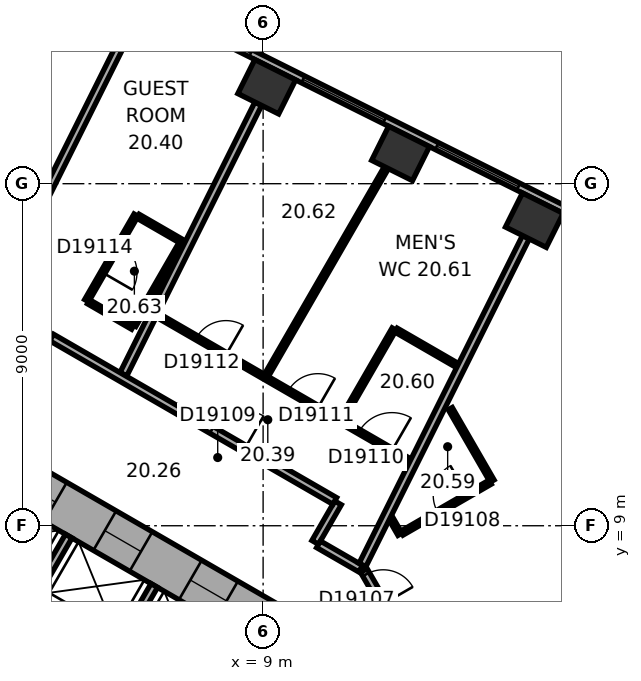
"""IFC4 building model, lengths in metres.
Left out: names, types, materials, properties, quantities, classifications, styles, units other than length and angle.
Written with IfcOpenShell. Run it as: python <this file> out.ifc"""

import sys

from ifc_helpers import new_model, si_unit, direction, frame, frame_2d, origin, origin_2d, place, context, subcontext, project, spatial, rectangle, extrude, element, fill, save


model = new_model("IFC4")
c1 = context("Model", 3, precision=1e-05, world=origin(), true_north=direction((0.0, 1.0)))
c2 = subcontext(c1, "Body", "Model", "MODEL_VIEW")
j1 = project(units=[si_unit("LENGTHUNIT", "METRE"), si_unit("PLANEANGLEUNIT", "RADIAN")], contexts=[c1])
p1 = place(None, origin())
s1 = spatial("IfcSite", under=j1, at=p1, CompositionType="ELEMENT")
p2 = place(p1, origin())
s2 = spatial("IfcBuilding", under=s1, at=p2, CompositionType="ELEMENT")
p3 = place(p2, frame((0.0, 0.0, 90.2)))
s3 = spatial("IfcBuildingStorey", under=s2, at=p3, CompositionType="ELEMENT", Elevation=90.2)
for number, where, z_axis, x_axis in (
    (1, (16.138, 17.04, 0.0), (0.0, 0.0, 1.0), (-0.895, 0.446, 0.0)),
    (2, (12.616, 18.795, 0.0), (0.0, 0.0, 1.0), (-0.895, 0.446, 0.0)),
    (3, (9.095, 20.551, 0.0), (0.0, 0.0, 1.0), (-0.895, 0.446, 0.0)),
):
    element("IfcColumn", number, at=place(p3, frame(where, z_axis=z_axis, x_axis=x_axis)), inside=s3, PredefinedType="COLUMN", context=c2, shape_type="SweptSolid", body=[
        extrude(rectangle(XDim=1.2, YDim=1.0, at=origin_2d()), origin(), (0.0, 0.0, 1.0), 3.3),
    ])
p4 = place(p3, frame((10.4, 5.658, 0.0), z_axis=(0.0, 0.0, 1.0), x_axis=(-0.866021384402, 0.500006961711, 0.0)))
e4 = element("IfcWall", 4, at=p4, inside=s3, PredefinedType="SHEAR", context=c2, shape_type="SweptSolid", body=[
    extrude(rectangle(XDim=12.355, YDim=1.2, at=frame_2d((6.178, 0.0))), origin(), (0.0, 0.0, 1.0), 3.3),
])
p5 = place(p4, frame((2.728, 0.0, 0.0)))
e5 = element("IfcOpeningElement", 5, at=p5, cuts=e4, PredefinedType="OPENING", context=c2, shape_type="SweptSolid", body=[
    extrude(rectangle(XDim=1.1, YDim=2.1, at=frame_2d((0.55, 1.05))), frame((0.0, 0.61, 0.0), z_axis=(0.0, -1.0, 0.0), x_axis=(1.0, 0.0, 0.0)), (0.0, 0.0, 1.0), 1.22),
])
p6 = place(p4, frame((5.328, 0.0, 0.0)))
e6 = element("IfcOpeningElement", 6, at=p6, cuts=e4, PredefinedType="OPENING", context=c2, shape_type="SweptSolid", body=[
    extrude(rectangle(XDim=1.1, YDim=2.1, at=frame_2d((0.55, 1.05))), frame((0.0, 0.61, 0.0), z_axis=(0.0, -1.0, 0.0), x_axis=(1.0, 0.0, 0.0)), (0.0, 0.0, 1.0), 1.22),
])
p7 = place(p4, frame((7.928, 0.0, 0.0)))
e7 = element("IfcOpeningElement", 7, at=p7, cuts=e4, PredefinedType="OPENING", context=c2, shape_type="SweptSolid", body=[
    extrude(rectangle(XDim=1.1, YDim=2.1, at=frame_2d((0.55, 1.05))), frame((0.0, 0.61, 0.0), z_axis=(0.0, -1.0, 0.0), x_axis=(1.0, 0.0, 0.0)), (0.0, 0.0, 1.0), 1.22),
])
p8 = place(p3, frame((20.63, 15.47, 0.0), z_axis=(0.0, 0.0, 1.0), x_axis=(-0.894934518609, 0.446197498203, 0.0)))
e8 = element("IfcWall", 8, at=p8, inside=s3, PredefinedType="STANDARD", context=c2, shape_type="SweptSolid", body=[
    extrude(rectangle(XDim=21.246, YDim=0.2, at=frame_2d((10.623, 0.0))), origin(), (0.0, 0.0, 1.0), 3.3),
])
p9 = place(p8, frame((1.553, 0.0, 0.8)))
e9 = element("IfcOpeningElement", 9, at=p9, cuts=e8, PredefinedType="OPENING", context=c2, shape_type="SweptSolid", body=[
    extrude(rectangle(XDim=2.4, YDim=1.7, at=frame_2d((1.2, 0.85))), frame((0.0, 0.11, 0.0), z_axis=(0.0, -1.0, 0.0), x_axis=(1.0, 0.0, 0.0)), (0.0, 0.0, 1.0), 0.22),
])
p10 = place(p8, frame((5.488, 0.0, 0.8)))
e10 = element("IfcOpeningElement", 10, at=p10, cuts=e8, PredefinedType="OPENING", context=c2, shape_type="SweptSolid", body=[
    extrude(rectangle(XDim=2.4, YDim=1.7, at=frame_2d((1.2, 0.85))), frame((0.0, 0.11, 0.0), z_axis=(0.0, -1.0, 0.0), x_axis=(1.0, 0.0, 0.0)), (0.0, 0.0, 1.0), 0.22),
])
p11 = place(p8, frame((9.422, 0.0, 0.8)))
e11 = element("IfcOpeningElement", 11, at=p11, cuts=e8, PredefinedType="OPENING", context=c2, shape_type="SweptSolid", body=[
    extrude(rectangle(XDim=2.4, YDim=1.7, at=frame_2d((1.2, 0.85))), frame((0.0, 0.11, 0.0), z_axis=(0.0, -1.0, 0.0), x_axis=(1.0, 0.0, 0.0)), (0.0, 0.0, 1.0), 0.22),
])
p12 = place(p8, frame((13.357, 0.0, 0.8)))
e12 = element("IfcOpeningElement", 12, at=p12, cuts=e8, PredefinedType="OPENING", context=c2, shape_type="SweptSolid", body=[
    extrude(rectangle(XDim=2.4, YDim=1.7, at=frame_2d((1.2, 0.85))), frame((0.0, 0.11, 0.0), z_axis=(0.0, -1.0, 0.0), x_axis=(1.0, 0.0, 0.0)), (0.0, 0.0, 1.0), 0.22),
])
p13 = place(p8, frame((17.292, 0.0, 0.8)))
e13 = element("IfcOpeningElement", 13, at=p13, cuts=e8, PredefinedType="OPENING", context=c2, shape_type="SweptSolid", body=[
    extrude(rectangle(XDim=2.4, YDim=1.7, at=frame_2d((1.2, 0.85))), frame((0.0, 0.11, 0.0), z_axis=(0.0, -1.0, 0.0), x_axis=(1.0, 0.0, 0.0)), (0.0, 0.0, 1.0), 0.22),
])
p14 = place(p3, frame((7.424, 4.259, 0.0), z_axis=(0.0, 0.0, 1.0), x_axis=(-0.866026010844, 0.49999894854, 0.0)))
e14 = element("IfcWall", 14, at=p14, inside=s3, PredefinedType="PARTITIONING", context=c2, shape_type="SweptSolid", body=[
    extrude(rectangle(XDim=8.0, YDim=0.2, at=frame_2d((4.0, 0.0))), origin(), (0.0, 0.0, 1.0), 3.05),
])
for number, where, z_axis, x_axis in (
    (15, (5.036, 5.522, 0.0), (0.0, 0.0, 1.0), (0.5, 0.866, 0.0)),
    (16, (2.784, 6.822, 0.0), (0.0, 0.0, 1.0), (0.5, 0.866, 0.0)),
):
    element("IfcWall", number, at=place(p3, frame(where, z_axis=z_axis, x_axis=x_axis)), inside=s3, PredefinedType="PARTITIONING", context=c2, shape_type="SweptSolid", body=[
        extrude(rectangle(XDim=2.2, YDim=0.2, at=frame_2d((1.1, 0.0))), origin(), (0.0, 0.0, 1.0), 3.05),
    ])
p15 = place(p3, frame((6.303, 4.617, 0.0), z_axis=(0.0, 0.0, 1.0), x_axis=(-0.866027801685, 0.499995846692, 0.0)))
e17 = element("IfcWall", 17, at=p15, inside=s3, PredefinedType="SHEAR", context=c2, shape_type="SweptSolid", body=[
    extrude(rectangle(XDim=7.06, YDim=0.3, at=frame_2d((3.53, 0.0))), origin(), (0.0, 0.0, 1.0), 3.05),
])
p16 = place(p3, frame((4.356, 14.922, 0.0), z_axis=(0.0, 0.0, 1.0), x_axis=(0.499936506574, 0.866062058628, 0.0)))
e18 = element("IfcWall", 18, at=p16, inside=s3, PredefinedType="PARTITIONING", context=c2, shape_type="SweptSolid", body=[
    extrude(rectangle(XDim=2.6, YDim=0.12, at=frame_2d((1.3, 0.0))), origin(), (0.0, 0.0, 1.0), 3.05),
])
p17 = place(p16, frame((0.85, 0.0, 0.0)))
e19 = element("IfcOpeningElement", 19, at=p17, cuts=e18, PredefinedType="OPENING", context=c2, shape_type="SweptSolid", body=[
    extrude(rectangle(XDim=0.9, YDim=2.1, at=frame_2d((0.45, 1.05))), frame((0.0, 0.07, 0.0), z_axis=(0.0, -1.0, 0.0), x_axis=(1.0, 0.0, 0.0)), (0.0, 0.0, 1.0), 0.14),
])
p18 = place(p3, frame((5.351, 21.859, 0.0), z_axis=(0.0, 0.0, 1.0), x_axis=(-0.446205309328, -0.894930624086, 0.0)))
e20 = element("IfcWall", 20, at=p18, inside=s3, PredefinedType="PARTITIONING", context=c2, shape_type="SweptSolid", body=[
    extrude(rectangle(XDim=8.913, YDim=0.2, at=frame_2d((4.457, 0.0))), origin(), (0.0, 0.0, 1.0), 2.6),
])
p19 = place(p3, frame((5.569, 14.222, 0.0), z_axis=(0.0, 0.0, 1.0), x_axis=(-0.866036909293, 0.499980071345, 0.0)))
e21 = element("IfcWall", 21, at=p19, inside=s3, PredefinedType="PARTITIONING", context=c2, shape_type="SweptSolid", body=[
    extrude(rectangle(XDim=1.34, YDim=0.12, at=frame_2d((0.67, 0.0))), origin(), (0.0, 0.0, 1.0), 3.05),
])
p20 = place(p3, frame((5.708, 17.144, 0.0), z_axis=(0.0, 0.0, 1.0), x_axis=(0.866082447003, -0.499901185229, 0.0)))
e22 = element("IfcWall", 22, at=p20, inside=s3, PredefinedType="PARTITIONING", context=c2, shape_type="SweptSolid", body=[
    extrude(rectangle(XDim=1.34, YDim=0.12, at=frame_2d((0.67, 0.0))), origin(), (0.0, 0.0, 1.0), 3.05),
])
p21 = place(p3, frame((6.839, 16.422, 0.0), z_axis=(0.0, 0.0, 1.0), x_axis=(-0.50000366821, -0.866023285932, 0.0)))
e23 = element("IfcWall", 23, at=p21, inside=s3, PredefinedType="PARTITIONING", context=c2, shape_type="SweptSolid", body=[
    extrude(rectangle(XDim=2.48, YDim=0.12, at=frame_2d((1.24, 0.0))), origin(), (0.0, 0.0, 1.0), 3.05),
])
p22 = place(p3, frame((8.872, 20.104, 0.0), z_axis=(0.0, 0.0, 1.0), x_axis=(-0.446218378653, -0.894924107706, 0.0)))
e24 = element("IfcWall", 24, at=p22, inside=s3, PredefinedType="PARTITIONING", context=c2, shape_type="SweptSolid", body=[
    extrude(rectangle(XDim=7.95, YDim=0.2, at=frame_2d((3.975, 0.0))), origin(), (0.0, 0.0, 1.0), 3.05),
])
p23 = place(p3, frame((10.371, 8.561, 0.0), z_axis=(0.0, 0.0, 1.0), x_axis=(0.499986357472, 0.866033280158, 0.0)))
e25 = element("IfcWall", 25, at=p23, inside=s3, PredefinedType="PARTITIONING", context=c2, shape_type="SweptSolid", body=[
    extrude(rectangle(XDim=1.201, YDim=0.2, at=frame_2d((0.601, 0.0))), origin(), (0.0, 0.0, 1.0), 3.05),
])
p24 = place(p3, frame((10.885, 9.652, 0.0), z_axis=(0.0, 0.0, 1.0), x_axis=(-0.866033868542, 0.499985338323, 0.0)))
e26 = element("IfcWall", 26, at=p24, inside=s3, PredefinedType="PARTITIONING", context=c2, shape_type="SweptSolid", body=[
    extrude(rectangle(XDim=8.602, YDim=0.2, at=frame_2d((4.301, 0.0))), origin(), (0.0, 0.0, 1.0), 3.05),
])
p25 = place(p24, frame((2.739, 0.0, 0.0)))
e27 = element("IfcOpeningElement", 27, at=p25, cuts=e26, PredefinedType="OPENING", context=c2, shape_type="SweptSolid", body=[
    extrude(rectangle(XDim=1.0, YDim=2.1, at=frame_2d((0.5, 1.05))), frame((0.0, 0.11, 0.0), z_axis=(0.0, -1.0, 0.0), x_axis=(1.0, 0.0, 0.0)), (0.0, 0.0, 1.0), 0.22),
])
p26 = place(p3, frame((11.566, 7.871, 0.0), z_axis=(0.0, 0.0, 1.0), x_axis=(-0.866004557827, 0.500036104519, 0.0)))
e28 = element("IfcWall", 28, at=p26, inside=s3, PredefinedType="PARTITIONING", context=c2, shape_type="SweptSolid", body=[
    extrude(rectangle(XDim=1.28, YDim=0.2, at=frame_2d((0.64, 0.0))), origin(), (0.0, 0.0, 1.0), 3.05),
])
p27 = place(p3, frame((12.243, 18.423, 0.0), z_axis=(0.0, 0.0, 1.0), x_axis=(-0.499993523031, -0.866029143232, 0.0)))
e29 = element("IfcWall", 29, at=p27, inside=s3, PredefinedType="PARTITIONING", context=c2, shape_type="SweptSolid", body=[
    extrude(rectangle(XDim=6.315, YDim=0.12, at=frame_2d((3.157, 0.0))), origin(), (0.0, 0.0, 1.0), 2.6),
])
p28 = place(p3, frame((12.448, 14.177, 0.0), z_axis=(0.0, 0.0, 1.0), x_axis=(-0.500048966069, -0.865997131366, 0.0)))
e30 = element("IfcWall", 30, at=p28, inside=s3, PredefinedType="PARTITIONING", context=c2, shape_type="SweptSolid", body=[
    extrude(rectangle(XDim=2.74, YDim=0.12, at=frame_2d((1.37, 0.0))), origin(), (0.0, 0.0, 1.0), 3.05),
])
p29 = place(p3, frame((12.58, 6.212, 0.0), z_axis=(0.0, 0.0, 1.0), x_axis=(-0.500063286585, 0.865988862174, 0.0)))
e31 = element("IfcWall", 31, at=p29, inside=s3, PredefinedType="PARTITIONING", context=c2, shape_type="SweptSolid", body=[
    extrude(rectangle(XDim=1.86, YDim=0.2, at=frame_2d((0.93, 0.0))), origin(), (0.0, 0.0, 1.0), 3.05),
])
p30 = place(p29, frame((0.842, 0.0, 0.0)))
e32 = element("IfcOpeningElement", 32, at=p30, cuts=e31, PredefinedType="OPENING", context=c2, shape_type="SweptSolid", body=[
    extrude(rectangle(XDim=0.9, YDim=2.1, at=frame_2d((0.45, 1.05))), frame((0.0, 0.11, 0.0), z_axis=(0.0, -1.0, 0.0), x_axis=(1.0, 0.0, 0.0)), (0.0, 0.0, 1.0), 0.22),
])
p31 = place(p3, frame((12.601, 8.776, 0.0), z_axis=(0.0, 0.0, 1.0), x_axis=(-0.500166486798, 0.865929261247, 0.0)))
e33 = element("IfcWall", 33, at=p31, inside=s3, PredefinedType="PARTITIONING", context=c2, shape_type="SweptSolid", body=[
    extrude(rectangle(XDim=0.476, YDim=0.12, at=frame_2d((0.238, 0.0))), origin(), (0.0, 0.0, 1.0), 3.05),
])
p32 = place(p3, frame((12.866, 10.702, 0.0), z_axis=(0.0, 0.0, 1.0), x_axis=(-0.866023151433, 0.500003901167, 0.0)))
e34 = element("IfcWall", 34, at=p32, inside=s3, PredefinedType="PARTITIONING", context=c2, shape_type="SweptSolid", body=[
    extrude(rectangle(XDim=7.684, YDim=0.12, at=frame_2d((3.842, 0.0))), origin(), (0.0, 0.0, 1.0), 3.05),
])
p33 = place(p32, frame((0.55, 0.0, 0.0)))
e35 = element("IfcOpeningElement", 35, at=p33, cuts=e34, PredefinedType="OPENING", context=c2, shape_type="SweptSolid", body=[
    extrude(rectangle(XDim=1.0, YDim=2.1, at=frame_2d((0.5, 1.05))), frame((0.0, 0.07, 0.0), z_axis=(0.0, -1.0, 0.0), x_axis=(1.0, 0.0, 0.0)), (0.0, 0.0, 1.0), 0.14),
])
p34 = place(p32, frame((2.8, 0.0, 0.0)))
e36 = element("IfcOpeningElement", 36, at=p34, cuts=e34, PredefinedType="OPENING", context=c2, shape_type="SweptSolid", body=[
    extrude(rectangle(XDim=0.9, YDim=2.1, at=frame_2d((0.45, 1.05))), frame((0.0, 0.07, 0.0), z_axis=(0.0, -1.0, 0.0), x_axis=(1.0, 0.0, 0.0)), (0.0, 0.0, 1.0), 0.14),
])
p35 = place(p32, frame((5.592, 0.0, 0.0)))
e37 = element("IfcOpeningElement", 37, at=p35, cuts=e34, PredefinedType="OPENING", context=c2, shape_type="SweptSolid", body=[
    extrude(rectangle(XDim=0.9, YDim=2.1, at=frame_2d((0.45, 1.05))), frame((0.0, 0.07, 0.0), z_axis=(0.0, -1.0, 0.0), x_axis=(1.0, 0.0, 0.0)), (0.0, 0.0, 1.0), 0.14),
])
p36 = place(p3, frame((13.926, 12.081, 0.0), z_axis=(0.0, 0.0, 1.0), x_axis=(0.499994660107, -0.866028486751, 0.0)))
e38 = element("IfcWall", 38, at=p36, inside=s3, PredefinedType="PARTITIONING", context=c2, shape_type="SweptSolid", body=[
    extrude(rectangle(XDim=2.2, YDim=0.12, at=frame_2d((1.1, 0.0))), origin(), (0.0, 0.0, 1.0), 3.05),
])
p37 = place(p3, frame((14.118, 13.212, 0.0), z_axis=(0.0, 0.0, 1.0), x_axis=(-0.866039825209, 0.499975020527, 0.0)))
e39 = element("IfcWall", 39, at=p37, inside=s3, PredefinedType="PARTITIONING", context=c2, shape_type="SweptSolid", body=[
    extrude(rectangle(XDim=1.869, YDim=0.12, at=frame_2d((0.934, 0.0))), origin(), (0.0, 0.0, 1.0), 3.05),
])
p38 = place(p3, frame((14.974, 10.146, 0.0), z_axis=(0.0, 0.0, 1.0), x_axis=(-0.86599746015, -0.500048396672, 0.0)))
e40 = element("IfcWall", 40, at=p38, inside=s3, PredefinedType="PARTITIONING", context=c2, shape_type="SweptSolid", body=[
    extrude(rectangle(XDim=2.68, YDim=0.12, at=frame_2d((1.34, 0.0))), origin(), (0.0, 0.0, 1.0), 3.05),
])
p39 = place(p38, frame((0.69, 0.0, 0.0)))
e41 = element("IfcOpeningElement", 41, at=p39, cuts=e40, PredefinedType="OPENING", context=c2, shape_type="SweptSolid", body=[
    extrude(rectangle(XDim=0.9, YDim=2.1, at=frame_2d((0.45, 1.05))), frame((0.0, 0.07, 0.0), z_axis=(0.0, -1.0, 0.0), x_axis=(1.0, 0.0, 0.0)), (0.0, 0.0, 1.0), 0.14),
])
p40 = place(p3, frame((15.915, 16.592, 0.0), z_axis=(0.0, 0.0, 1.0), x_axis=(-0.446199736347, -0.894933402709, 0.0)))
e42 = element("IfcWall", 42, at=p40, inside=s3, PredefinedType="PARTITIONING", context=c2, shape_type="SweptSolid", body=[
    extrude(rectangle(XDim=9.635, YDim=0.2, at=frame_2d((4.817, 0.0))), origin(), (0.0, 0.0, 1.0), 3.05),
])
p41 = place(p10, origin())
e43 = element("IfcWindow", 43, at=p41, inside=s3, PartitioningType="SINGLE_PANEL", PredefinedType="WINDOW", context=c2, shape_type="SweptSolid", body=[
    extrude(rectangle(XDim=2.4, YDim=1.7, at=frame_2d((1.2, 0.85))), frame((0.0, 0.03, 0.0), z_axis=(0.0, -1.0, 0.0), x_axis=(1.0, 0.0, 0.0)), (0.0, 0.0, 1.0), 0.06),
])
fill(e10, e43)
p42 = place(p11, origin())
e44 = element("IfcWindow", 44, at=p42, inside=s3, PartitioningType="SINGLE_PANEL", PredefinedType="WINDOW", context=c2, shape_type="SweptSolid", body=[
    extrude(rectangle(XDim=2.4, YDim=1.7, at=frame_2d((1.2, 0.85))), frame((0.0, 0.03, 0.0), z_axis=(0.0, -1.0, 0.0), x_axis=(1.0, 0.0, 0.0)), (0.0, 0.0, 1.0), 0.06),
])
fill(e11, e44)
p43 = place(p12, origin())
e45 = element("IfcWindow", 45, at=p43, inside=s3, PartitioningType="SINGLE_PANEL", PredefinedType="WINDOW", context=c2, shape_type="SweptSolid", body=[
    extrude(rectangle(XDim=2.4, YDim=1.7, at=frame_2d((1.2, 0.85))), frame((0.0, 0.03, 0.0), z_axis=(0.0, -1.0, 0.0), x_axis=(1.0, 0.0, 0.0)), (0.0, 0.0, 1.0), 0.06),
])
fill(e12, e45)
p44 = place(p5, origin())
e46 = element("IfcDoor", 46, at=p44, inside=s3, OperationType="DOUBLE_DOOR_SLIDING", PredefinedType="DOOR", context=c2, shape_type="SweptSolid", body=[
    extrude(rectangle(XDim=1.1, YDim=2.1, at=frame_2d((0.55, 1.05))), frame((0.0, 0.025, 0.0), z_axis=(0.0, -1.0, 0.0), x_axis=(1.0, 0.0, 0.0)), (0.0, 0.0, 1.0), 0.05),
])
fill(e5, e46)
p45 = place(p6, origin())
e47 = element("IfcDoor", 47, at=p45, inside=s3, OperationType="DOUBLE_DOOR_SLIDING", PredefinedType="DOOR", context=c2, shape_type="SweptSolid", body=[
    extrude(rectangle(XDim=1.1, YDim=2.1, at=frame_2d((0.55, 1.05))), frame((0.0, 0.025, 0.0), z_axis=(0.0, -1.0, 0.0), x_axis=(1.0, 0.0, 0.0)), (0.0, 0.0, 1.0), 0.05),
])
fill(e6, e47)
p46 = place(p7, origin())
e48 = element("IfcDoor", 48, at=p46, inside=s3, OperationType="DOUBLE_DOOR_SLIDING", PredefinedType="DOOR", context=c2, shape_type="SweptSolid", body=[
    extrude(rectangle(XDim=1.1, YDim=2.1, at=frame_2d((0.55, 1.05))), frame((0.0, 0.025, 0.0), z_axis=(0.0, -1.0, 0.0), x_axis=(1.0, 0.0, 0.0)), (0.0, 0.0, 1.0), 0.05),
])
fill(e7, e48)
p47 = place(p30, origin())
e49 = element("IfcDoor", 49, at=p47, inside=s3, OperationType="SINGLE_SWING_LEFT", PredefinedType="DOOR", context=c2, shape_type="SweptSolid", body=[
    extrude(rectangle(XDim=0.9, YDim=2.1, at=frame_2d((0.45, 1.05))), frame((0.0, 0.025, 0.0), z_axis=(0.0, -1.0, 0.0), x_axis=(1.0, 0.0, 0.0)), (0.0, 0.0, 1.0), 0.05),
])
fill(e32, e49)
p48 = place(p39, origin())
e50 = element("IfcDoor", 50, at=p48, inside=s3, OperationType="SINGLE_SWING_LEFT", PredefinedType="DOOR", context=c2, shape_type="SweptSolid", body=[
    extrude(rectangle(XDim=0.9, YDim=2.1, at=frame_2d((0.45, 1.05))), frame((0.0, 0.025, 0.0), z_axis=(0.0, -1.0, 0.0), x_axis=(1.0, 0.0, 0.0)), (0.0, 0.0, 1.0), 0.05),
])
fill(e41, e50)
p49 = place(p25, origin())
e51 = element("IfcDoor", 51, at=p49, inside=s3, OperationType="SINGLE_SWING_LEFT", PredefinedType="DOOR", context=c2, shape_type="SweptSolid", body=[
    extrude(rectangle(XDim=1.0, YDim=2.1, at=frame_2d((0.5, 1.05))), frame((0.0, 0.025, 0.0), z_axis=(0.0, -1.0, 0.0), x_axis=(1.0, 0.0, 0.0)), (0.0, 0.0, 1.0), 0.05),
])
fill(e27, e51)
p50 = place(p33, origin())
e52 = element("IfcDoor", 52, at=p50, inside=s3, OperationType="SINGLE_SWING_LEFT", PredefinedType="DOOR", context=c2, shape_type="SweptSolid", body=[
    extrude(rectangle(XDim=1.0, YDim=2.1, at=frame_2d((0.5, 1.05))), frame((0.0, 0.025, 0.0), z_axis=(0.0, -1.0, 0.0), x_axis=(1.0, 0.0, 0.0)), (0.0, 0.0, 1.0), 0.05),
])
fill(e35, e52)
p51 = place(p34, origin())
e53 = element("IfcDoor", 53, at=p51, inside=s3, OperationType="SINGLE_SWING_LEFT", PredefinedType="DOOR", context=c2, shape_type="SweptSolid", body=[
    extrude(rectangle(XDim=0.9, YDim=2.1, at=frame_2d((0.45, 1.05))), frame((0.0, 0.025, 0.0), z_axis=(0.0, -1.0, 0.0), x_axis=(1.0, 0.0, 0.0)), (0.0, 0.0, 1.0), 0.05),
])
fill(e36, e53)
p52 = place(p35, origin())
e54 = element("IfcDoor", 54, at=p52, inside=s3, OperationType="SINGLE_SWING_LEFT", PredefinedType="DOOR", context=c2, shape_type="SweptSolid", body=[
    extrude(rectangle(XDim=0.9, YDim=2.1, at=frame_2d((0.45, 1.05))), frame((0.0, 0.025, 0.0), z_axis=(0.0, -1.0, 0.0), x_axis=(1.0, 0.0, 0.0)), (0.0, 0.0, 1.0), 0.05),
])
fill(e37, e54)
p53 = place(p17, origin())
e55 = element("IfcDoor", 55, at=p53, inside=s3, OperationType="SINGLE_SWING_LEFT", PredefinedType="DOOR", context=c2, shape_type="SweptSolid", body=[
    extrude(rectangle(XDim=0.9, YDim=2.1, at=frame_2d((0.45, 1.05))), frame((0.0, 0.025, 0.0), z_axis=(0.0, -1.0, 0.0), x_axis=(1.0, 0.0, 0.0)), (0.0, 0.0, 1.0), 0.05),
])
fill(e19, e55)
save(model, sys.argv[1])
